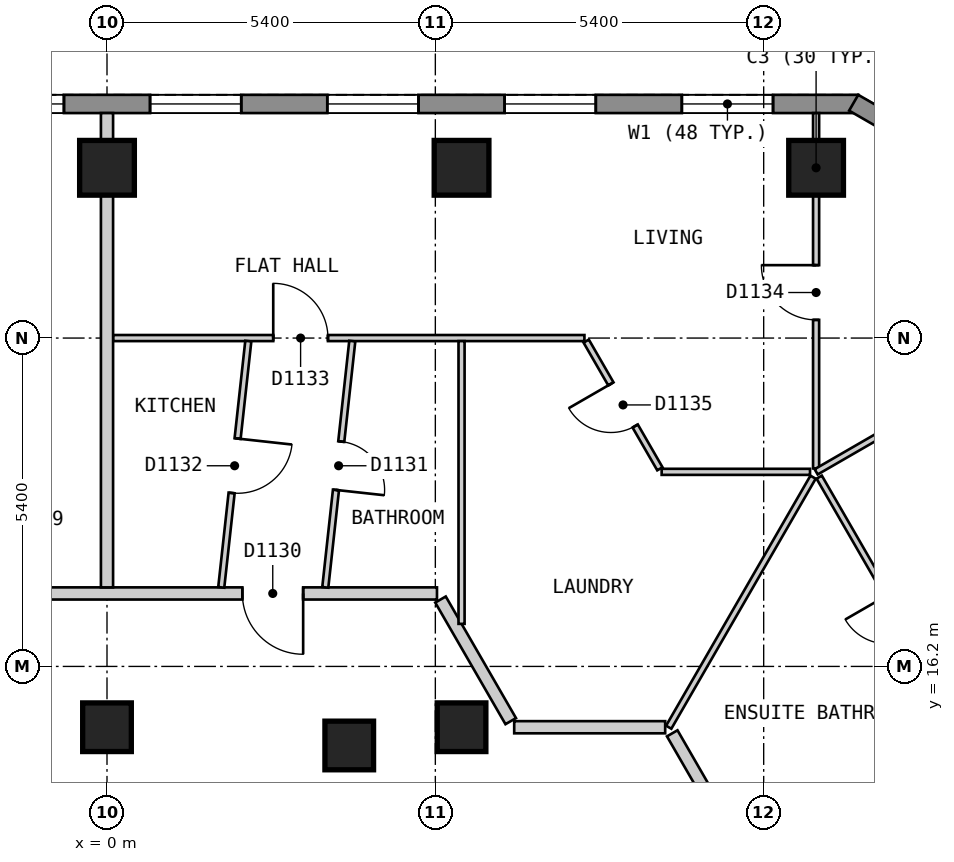
"""IFC4 building model, lengths in metres.
Left out: names, types, materials, properties, quantities, classifications, styles, units other than length and angle.
Written with IfcOpenShell. Run it as: python <this file> out.ifc"""

import sys

from ifc_helpers import new_model, si_unit, direction, frame, frame_2d, origin, origin_2d, place, context, subcontext, project, spatial, polyline, rectangle, outline, extrude, element, fill, save


model = new_model("IFC4")
c1 = context("Model", 3, precision=1e-05, world=origin(), true_north=direction((0.0, 1.0)))
c2 = subcontext(c1, "Body", "Model", "MODEL_VIEW")
j1 = project(units=[si_unit("LENGTHUNIT", "METRE"), si_unit("PLANEANGLEUNIT", "RADIAN")], contexts=[c1])
p1 = place(None, origin())
s1 = spatial("IfcSite", under=j1, at=p1, CompositionType="ELEMENT")
p2 = place(p1, origin())
s2 = spatial("IfcBuilding", under=s1, at=p2, CompositionType="ELEMENT")
p3 = place(p2, frame((0.0, 0.0, 144.6)))
s3 = spatial("IfcBuildingStorey", under=s2, at=p3, CompositionType="ELEMENT", Elevation=144.6)
for number, where, z_axis, x_axis in (
    (1, (11.662, 24.4, 0.0), (0.0, 0.0, 1.0), (-1.0, 0.0, 0.0)),
    (2, (5.831, 24.4, 0.0), (0.0, 0.0, 1.0), (-1.0, 0.0, 0.0)),
    (3, (0.0, 24.4, 0.0), (0.0, 0.0, 1.0), (-1.0, 0.0, 0.0)),
):
    element("IfcColumn", number, at=place(p3, frame(where, z_axis=z_axis, x_axis=x_axis)), inside=s3, PredefinedType="COLUMN", context=c2, shape_type="SweptSolid", body=[
        extrude(rectangle(XDim=0.9, YDim=0.9, at=origin_2d()), origin(), (0.0, 0.0, 1.0), 3.0),
    ])
for number, where, z_axis, x_axis in (
    (4, (5.831, 15.2, 0.0), (0.0, 0.0, 1.0), (-1.0, 0.0, 0.0)),
    (5, (3.984, 14.9, 0.0), (0.0, 0.0, 1.0), (1.0, 0.0, 0.0)),
    (6, (0.0, 15.2, 0.0), (0.0, 0.0, 1.0), (-1.0, 0.0, 0.0)),
):
    element("IfcColumn", number, at=place(p3, frame(where, z_axis=z_axis, x_axis=x_axis)), inside=s3, PredefinedType="COLUMN", context=c2, shape_type="SweptSolid", body=[
        extrude(rectangle(XDim=0.8, YDim=0.8, at=origin_2d()), origin(), (0.0, 0.0, 1.0), 3.0),
    ])
p4 = place(p3, frame((12.355, 25.45, 0.0), z_axis=(0.0, 0.0, 1.0), x_axis=(-1.0, 0.0, 0.0)))
e7 = element("IfcWall", 7, at=p4, inside=s3, PredefinedType="SOLIDWALL", context=c2, shape_type="SweptSolid", body=[
    extrude(outline(polyline([(0.0, -0.15), (24.71, -0.15), (24.63, 0.15), (0.08, 0.15), (0.0, -0.15)])), origin(), (0.0, 0.0, 1.0), 2.7),
])
p5 = place(p4, frame((1.401, 0.0, 0.15)))
e8 = element("IfcOpeningElement", 8, at=p5, cuts=e7, PredefinedType="OPENING", context=c2, shape_type="SweptSolid", body=[
    extrude(rectangle(XDim=1.5, YDim=2.1, at=frame_2d((0.75, 1.05))), frame((0.0, 0.16, 0.0), z_axis=(0.0, -1.0, 0.0), x_axis=(1.0, 0.0, 0.0)), (0.0, 0.0, 1.0), 0.32),
])
p6 = place(p4, frame((4.316, 0.0, 0.15)))
e9 = element("IfcOpeningElement", 9, at=p6, cuts=e7, PredefinedType="OPENING", context=c2, shape_type="SweptSolid", body=[
    extrude(rectangle(XDim=1.5, YDim=2.1, at=frame_2d((0.75, 1.05))), frame((0.0, 0.16, 0.0), z_axis=(0.0, -1.0, 0.0), x_axis=(1.0, 0.0, 0.0)), (0.0, 0.0, 1.0), 0.32),
])
p7 = place(p4, frame((7.232, 0.0, 0.15)))
e10 = element("IfcOpeningElement", 10, at=p7, cuts=e7, PredefinedType="OPENING", context=c2, shape_type="SweptSolid", body=[
    extrude(rectangle(XDim=1.5, YDim=2.1, at=frame_2d((0.75, 1.05))), frame((0.0, 0.16, 0.0), z_axis=(0.0, -1.0, 0.0), x_axis=(1.0, 0.0, 0.0)), (0.0, 0.0, 1.0), 0.32),
])
p8 = place(p4, frame((10.147, 0.0, 0.15)))
e11 = element("IfcOpeningElement", 11, at=p8, cuts=e7, PredefinedType="OPENING", context=c2, shape_type="SweptSolid", body=[
    extrude(rectangle(XDim=1.5, YDim=2.1, at=frame_2d((0.75, 1.05))), frame((0.0, 0.16, 0.0), z_axis=(0.0, -1.0, 0.0), x_axis=(1.0, 0.0, 0.0)), (0.0, 0.0, 1.0), 0.32),
])
p9 = place(p4, frame((13.063, 0.0, 0.15)))
e12 = element("IfcOpeningElement", 12, at=p9, cuts=e7, PredefinedType="OPENING", context=c2, shape_type="SweptSolid", body=[
    extrude(rectangle(XDim=1.5, YDim=2.1, at=frame_2d((0.75, 1.05))), frame((0.0, 0.16, 0.0), z_axis=(0.0, -1.0, 0.0), x_axis=(1.0, 0.0, 0.0)), (0.0, 0.0, 1.0), 0.32),
])
p10 = place(p4, frame((15.978, 0.0, 0.15)))
e13 = element("IfcOpeningElement", 13, at=p10, cuts=e7, PredefinedType="OPENING", context=c2, shape_type="SweptSolid", body=[
    extrude(rectangle(XDim=1.5, YDim=2.1, at=frame_2d((0.75, 1.05))), frame((0.0, 0.16, 0.0), z_axis=(0.0, -1.0, 0.0), x_axis=(1.0, 0.0, 0.0)), (0.0, 0.0, 1.0), 0.32),
])
p11 = place(p4, frame((18.894, 0.0, 0.15)))
e14 = element("IfcOpeningElement", 14, at=p11, cuts=e7, PredefinedType="OPENING", context=c2, shape_type="SweptSolid", body=[
    extrude(rectangle(XDim=1.5, YDim=2.1, at=frame_2d((0.75, 1.05))), frame((0.0, 0.16, 0.0), z_axis=(0.0, -1.0, 0.0), x_axis=(1.0, 0.0, 0.0)), (0.0, 0.0, 1.0), 0.32),
])
p12 = place(p4, frame((21.809, 0.0, 0.15)))
e15 = element("IfcOpeningElement", 15, at=p12, cuts=e7, PredefinedType="OPENING", context=c2, shape_type="SweptSolid", body=[
    extrude(rectangle(XDim=1.5, YDim=2.1, at=frame_2d((0.75, 1.05))), frame((0.0, 0.16, 0.0), z_axis=(0.0, -1.0, 0.0), x_axis=(1.0, 0.0, 0.0)), (0.0, 0.0, 1.0), 0.32),
])
p13 = place(p3, frame((16.61, 22.97, 0.0), z_axis=(0.0, 0.0, 1.0), x_axis=(-0.866022959057, 0.500004234368, 0.0)))
e16 = element("IfcWall", 16, at=p13, inside=s3, PredefinedType="SOLIDWALL", context=c2, shape_type="SweptSolid", body=[
    extrude(outline(polyline([(0.0, -0.15), (5.0, -0.15), (4.92, 0.15), (0.08, 0.15), (0.0, -0.15)])), origin(), (0.0, 0.0, 1.0), 2.7),
])
p14 = place(p13, frame((0.65, 0.0, 0.15)))
e17 = element("IfcOpeningElement", 17, at=p14, cuts=e16, PredefinedType="OPENING", context=c2, shape_type="SweptSolid", body=[
    extrude(rectangle(XDim=1.2, YDim=2.1, at=frame_2d((0.6, 1.05))), frame((0.0, 0.16, 0.0), z_axis=(0.0, -1.0, 0.0), x_axis=(1.0, 0.0, 0.0)), (0.0, 0.0, 1.0), 0.32),
])
p15 = place(p13, frame((3.15, 0.0, 0.15)))
e18 = element("IfcOpeningElement", 18, at=p15, cuts=e16, PredefinedType="OPENING", context=c2, shape_type="SweptSolid", body=[
    extrude(rectangle(XDim=1.2, YDim=2.1, at=frame_2d((0.6, 1.05))), frame((0.0, 0.16, 0.0), z_axis=(0.0, -1.0, 0.0), x_axis=(1.0, 0.0, 0.0)), (0.0, 0.0, 1.0), 0.32),
])
p16 = place(p3, frame((5.485, 17.3, 0.0), z_axis=(0.0, 0.0, 1.0), x_axis=(0.500027479704, -0.866009537788, 0.0)))
e19 = element("IfcWall", 19, at=p16, inside=s3, PredefinedType="PARTITIONING", context=c2, shape_type="SweptSolid", body=[
    extrude(rectangle(XDim=2.309, YDim=0.2, at=frame_2d((1.155, 0.0))), origin(), (0.0, 0.0, 1.0), 2.7),
])
p17 = place(p3, frame((9.296, 15.1, 0.0), z_axis=(0.0, 0.0, 1.0), x_axis=(0.499974024244, -0.866040400375, 0.0)))
e20 = element("IfcWall", 20, at=p17, inside=s3, PredefinedType="PARTITIONING", context=c2, shape_type="SweptSolid", body=[
    extrude(rectangle(XDim=16.857, YDim=0.2, at=frame_2d((8.429, 0.0))), origin(), (0.0, 0.0, 1.0), 2.7),
])
p18 = place(p17, frame((11.522, 0.0, 0.0)))
e21 = element("IfcOpeningElement", 21, at=p18, cuts=e20, PredefinedType="OPENING", context=c2, shape_type="SweptSolid", body=[
    extrude(rectangle(XDim=1.0, YDim=2.1, at=frame_2d((0.5, 1.05))), frame((0.0, 0.11, 0.0), z_axis=(0.0, -1.0, 0.0), x_axis=(1.0, 0.0, 0.0)), (0.0, 0.0, 1.0), 0.22),
])
p19 = place(p3, frame((6.697, 15.2, 0.0), z_axis=(0.0, 0.0, 1.0), x_axis=(1.0, 0.0, 0.0)))
e22 = element("IfcWall", 22, at=p19, inside=s3, PredefinedType="PARTITIONING", context=c2, shape_type="SweptSolid", body=[
    extrude(rectangle(XDim=2.483, YDim=0.2, at=frame_2d((1.241, 0.0))), origin(), (0.0, 0.0, 1.0), 2.7),
])
p20 = place(p3, frame((-5.312, 17.4, 0.0), z_axis=(0.0, 0.0, 1.0), x_axis=(1.0, 0.0, 0.0)))
e23 = element("IfcWall", 23, at=p20, inside=s3, PredefinedType="PARTITIONING", context=c2, shape_type="SweptSolid", body=[
    extrude(rectangle(XDim=10.739, YDim=0.2, at=frame_2d((5.37, 0.0))), origin(), (0.0, 0.0, 1.0), 2.7),
])
p21 = place(p20, frame((7.538, 0.0, 0.0)))
e24 = element("IfcOpeningElement", 24, at=p21, cuts=e23, PredefinedType="OPENING", context=c2, shape_type="SweptSolid", body=[
    extrude(rectangle(XDim=1.0, YDim=2.1, at=frame_2d((0.5, 1.05))), frame((0.0, 0.11, 0.0), z_axis=(0.0, -1.0, 0.0), x_axis=(1.0, 0.0, 0.0)), (0.0, 0.0, 1.0), 0.22),
])
p22 = place(p20, frame((1.864, 0.0, 0.0)))
e25 = element("IfcOpeningElement", 25, at=p22, cuts=e23, PredefinedType="OPENING", context=c2, shape_type="SweptSolid", body=[
    extrude(rectangle(XDim=1.0, YDim=2.1, at=frame_2d((0.5, 1.05))), frame((0.0, 0.11, 0.0), z_axis=(0.0, -1.0, 0.0), x_axis=(1.0, 0.0, 0.0)), (0.0, 0.0, 1.0), 0.22),
])
p23 = place(p3, frame((7.881, 21.55, 0.0), z_axis=(0.0, 0.0, 1.0), x_axis=(0.499821239653, -0.866128586522, 0.0)))
e26 = element("IfcWall", 26, at=p23, inside=s3, PredefinedType="PARTITIONING", context=c2, shape_type="SweptSolid", body=[
    extrude(rectangle(XDim=2.425, YDim=0.1, at=frame_2d((1.212, 0.0))), origin(), (0.0, 0.0, 1.0), 2.7),
])
p24 = place(p23, frame((0.812, 0.0, 0.0)))
e27 = element("IfcOpeningElement", 27, at=p24, cuts=e26, PredefinedType="OPENING", context=c2, shape_type="SweptSolid", body=[
    extrude(rectangle(XDim=0.8, YDim=2.1, at=frame_2d((0.4, 1.05))), frame((0.0, 0.06, 0.0), z_axis=(0.0, -1.0, 0.0), x_axis=(1.0, 0.0, 0.0)), (0.0, 0.0, 1.0), 0.12),
])
p25 = place(p3, frame((11.713, 19.313, 0.0), z_axis=(0.0, 0.0, 1.0), x_axis=(0.499945064984, -0.866057118208, 0.0)))
e28 = element("IfcWall", 28, at=p25, inside=s3, PredefinedType="PARTITIONING", context=c2, shape_type="SweptSolid", body=[
    extrude(rectangle(XDim=5.285, YDim=0.1, at=frame_2d((2.642, 0.0))), origin(), (0.0, 0.0, 1.0), 2.7),
])
p26 = place(p25, frame((2.242, 0.0, 0.0)))
e29 = element("IfcOpeningElement", 29, at=p26, cuts=e28, PredefinedType="OPENING", context=c2, shape_type="SweptSolid", body=[
    extrude(rectangle(XDim=0.8, YDim=2.1, at=frame_2d((0.4, 1.05))), frame((0.0, 0.06, 0.0), z_axis=(0.0, -1.0, 0.0), x_axis=(1.0, 0.0, 0.0)), (0.0, 0.0, 1.0), 0.12),
])
p27 = place(p3, frame((9.122, 19.4, 0.0), z_axis=(0.0, 0.0, 1.0), x_axis=(1.0, 0.0, 0.0)))
e30 = element("IfcWall", 30, at=p27, inside=s3, PredefinedType="PARTITIONING", context=c2, shape_type="SweptSolid", body=[
    extrude(rectangle(XDim=2.44, YDim=0.1, at=frame_2d((1.22, 0.0))), origin(), (0.0, 0.0, 1.0), 2.7),
])
p28 = place(p3, frame((0.1, 21.6, 0.0), z_axis=(0.0, 0.0, 1.0), x_axis=(1.0, 0.0, 0.0)))
e31 = element("IfcWall", 31, at=p28, inside=s3, PredefinedType="PARTITIONING", context=c2, shape_type="SweptSolid", body=[
    extrude(rectangle(XDim=7.752, YDim=0.1, at=frame_2d((3.876, 0.0))), origin(), (0.0, 0.0, 1.0), 2.7),
])
p29 = place(p28, frame((2.634, 0.0, 0.0)))
e32 = element("IfcOpeningElement", 32, at=p29, cuts=e31, PredefinedType="OPENING", context=c2, shape_type="SweptSolid", body=[
    extrude(rectangle(XDim=0.9, YDim=2.1, at=frame_2d((0.45, 1.05))), frame((0.0, 0.06, 0.0), z_axis=(0.0, -1.0, 0.0), x_axis=(1.0, 0.0, 0.0)), (0.0, 0.0, 1.0), 0.12),
])
p30 = place(p3, frame((9.238, 15.2, 0.0), z_axis=(0.0, 0.0, 1.0), x_axis=(0.499988022762, 0.866032318735, 0.0)))
e33 = element("IfcWall", 33, at=p30, inside=s3, PredefinedType="PARTITIONING", context=c2, shape_type="SweptSolid", body=[
    extrude(rectangle(XDim=4.748, YDim=0.1, at=frame_2d((2.374, 0.0))), origin(), (0.0, 0.0, 1.0), 2.7),
])
p31 = place(p3, frame((3.59, 17.5, 0.0), z_axis=(0.0, 0.0, 1.0), x_axis=(0.108938463119, 0.994048495423, 0.0)))
e34 = element("IfcWall", 34, at=p31, inside=s3, PredefinedType="PARTITIONING", context=c2, shape_type="SweptSolid", body=[
    extrude(rectangle(XDim=4.074, YDim=0.1, at=frame_2d((2.037, 0.0))), origin(), (0.0, 0.0, 1.0), 2.7),
])
p32 = place(p31, frame((1.612, 0.0, 0.0)))
e35 = element("IfcOpeningElement", 35, at=p32, cuts=e34, PredefinedType="OPENING", context=c2, shape_type="SweptSolid", body=[
    extrude(rectangle(XDim=0.8, YDim=2.1, at=frame_2d((0.4, 1.05))), frame((0.0, 0.06, 0.0), z_axis=(0.0, -1.0, 0.0), x_axis=(1.0, 0.0, 0.0)), (0.0, 0.0, 1.0), 0.12),
])
p33 = place(p3, frame((1.879, 17.5, 0.0), z_axis=(0.0, 0.0, 1.0), x_axis=(0.10923450369, 0.994016007519, 0.0)))
e36 = element("IfcWall", 36, at=p33, inside=s3, PredefinedType="PARTITIONING", context=c2, shape_type="SweptSolid", body=[
    extrude(rectangle(XDim=4.074, YDim=0.1, at=frame_2d((2.037, 0.0))), origin(), (0.0, 0.0, 1.0), 2.7),
])
p34 = place(p33, frame((1.562, 0.0, 0.0)))
e37 = element("IfcOpeningElement", 37, at=p34, cuts=e36, PredefinedType="OPENING", context=c2, shape_type="SweptSolid", body=[
    extrude(rectangle(XDim=0.9, YDim=2.1, at=frame_2d((0.45, 1.05))), frame((0.0, 0.06, 0.0), z_axis=(0.0, -1.0, 0.0), x_axis=(1.0, 0.0, 0.0)), (0.0, 0.0, 1.0), 0.12),
])
p35 = place(p3, frame((5.831, 16.9, 0.0), z_axis=(0.0, 0.0, 1.0), x_axis=(0.0, 1.0, 0.0)))
e38 = element("IfcWall", 38, at=p35, inside=s3, PredefinedType="PARTITIONING", context=c2, shape_type="SweptSolid", body=[
    extrude(rectangle(XDim=4.65, YDim=0.1, at=frame_2d((2.325, 0.0))), origin(), (0.0, 0.0, 1.0), 2.7),
])
p36 = place(p3, frame((11.662, 19.456, 0.0), z_axis=(0.0, 0.0, 1.0), x_axis=(0.0, 1.0, 0.0)))
e39 = element("IfcWall", 39, at=p36, inside=s3, PredefinedType="PARTITIONING", context=c2, shape_type="SweptSolid", body=[
    extrude(rectangle(XDim=5.844, YDim=0.1, at=frame_2d((2.922, 0.0))), origin(), (0.0, 0.0, 1.0), 2.7),
])
p37 = place(p36, frame((2.443, 0.0, 0.0)))
e40 = element("IfcOpeningElement", 40, at=p37, cuts=e39, PredefinedType="OPENING", context=c2, shape_type="SweptSolid", body=[
    extrude(rectangle(XDim=0.9, YDim=2.1, at=frame_2d((0.45, 1.05))), frame((0.0, 0.06, 0.0), z_axis=(0.0, -1.0, 0.0), x_axis=(1.0, 0.0, 0.0)), (0.0, 0.0, 1.0), 0.12),
])
p38 = place(p3, frame((11.663, 19.4, 0.0), z_axis=(0.0, 0.0, 1.0), x_axis=(0.865941558533, 0.500145196124, 0.0)))
e41 = element("IfcWall", 41, at=p38, inside=s3, PredefinedType="PARTITIONING", context=c2, shape_type="SweptSolid", body=[
    extrude(rectangle(XDim=5.899, YDim=0.1, at=frame_2d((2.949, 0.0))), origin(), (0.0, 0.0, 1.0), 2.7),
])
p39 = place(p38, frame((2.499, 0.0, 0.0)))
e42 = element("IfcOpeningElement", 42, at=p39, cuts=e41, PredefinedType="OPENING", context=c2, shape_type="SweptSolid", body=[
    extrude(rectangle(XDim=0.9, YDim=2.1, at=frame_2d((0.45, 1.05))), frame((0.0, 0.06, 0.0), z_axis=(0.0, -1.0, 0.0), x_axis=(1.0, 0.0, 0.0)), (0.0, 0.0, 1.0), 0.12),
])
p40 = place(p3, frame((0.0, 17.5, 0.0), z_axis=(0.0, 0.0, 1.0), x_axis=(0.0, 1.0, 0.0)))
e43 = element("IfcWall", 43, at=p40, inside=s3, PredefinedType="PARTITIONING", context=c2, shape_type="SweptSolid", body=[
    extrude(rectangle(XDim=7.8, YDim=0.2, at=frame_2d((3.9, 0.0))), origin(), (0.0, 0.0, 1.0), 2.7),
])
p41 = place(p3, frame((10.854, 12.6, 0.0), z_axis=(0.0, 0.0, 1.0), x_axis=(0.866031112038, 0.499990112884, 0.0)))
e44 = element("IfcWall", 44, at=p41, inside=s3, PredefinedType="PARTITIONING", context=c2, shape_type="SweptSolid", body=[
    extrude(rectangle(XDim=3.948, YDim=0.2, at=frame_2d((1.974, 0.0))), origin(), (0.0, 0.0, 1.0), 2.7),
])
p42 = place(p5, origin())
e45 = element("IfcWindow", 45, at=p42, inside=s3, PartitioningType="SINGLE_PANEL", PredefinedType="WINDOW", context=c2, shape_type="SweptSolid", body=[
    extrude(rectangle(XDim=1.5, YDim=2.1, at=frame_2d((0.75, 1.05))), frame((0.0, 0.03, 0.0), z_axis=(0.0, -1.0, 0.0), x_axis=(1.0, 0.0, 0.0)), (0.0, 0.0, 1.0), 0.06),
])
fill(e8, e45)
p43 = place(p6, origin())
e46 = element("IfcWindow", 46, at=p43, inside=s3, PartitioningType="SINGLE_PANEL", PredefinedType="WINDOW", context=c2, shape_type="SweptSolid", body=[
    extrude(rectangle(XDim=1.5, YDim=2.1, at=frame_2d((0.75, 1.05))), frame((0.0, 0.03, 0.0), z_axis=(0.0, -1.0, 0.0), x_axis=(1.0, 0.0, 0.0)), (0.0, 0.0, 1.0), 0.06),
])
fill(e9, e46)
p44 = place(p7, origin())
e47 = element("IfcWindow", 47, at=p44, inside=s3, PartitioningType="SINGLE_PANEL", PredefinedType="WINDOW", context=c2, shape_type="SweptSolid", body=[
    extrude(rectangle(XDim=1.5, YDim=2.1, at=frame_2d((0.75, 1.05))), frame((0.0, 0.03, 0.0), z_axis=(0.0, -1.0, 0.0), x_axis=(1.0, 0.0, 0.0)), (0.0, 0.0, 1.0), 0.06),
])
fill(e10, e47)
p45 = place(p8, origin())
e48 = element("IfcWindow", 48, at=p45, inside=s3, PartitioningType="SINGLE_PANEL", PredefinedType="WINDOW", context=c2, shape_type="SweptSolid", body=[
    extrude(rectangle(XDim=1.5, YDim=2.1, at=frame_2d((0.75, 1.05))), frame((0.0, 0.03, 0.0), z_axis=(0.0, -1.0, 0.0), x_axis=(1.0, 0.0, 0.0)), (0.0, 0.0, 1.0), 0.06),
])
fill(e11, e48)
p46 = place(p9, origin())
e49 = element("IfcWindow", 49, at=p46, inside=s3, PartitioningType="SINGLE_PANEL", PredefinedType="WINDOW", context=c2, shape_type="SweptSolid", body=[
    extrude(rectangle(XDim=1.5, YDim=2.1, at=frame_2d((0.75, 1.05))), frame((0.0, 0.03, 0.0), z_axis=(0.0, -1.0, 0.0), x_axis=(1.0, 0.0, 0.0)), (0.0, 0.0, 1.0), 0.06),
])
fill(e12, e49)
p47 = place(p21, origin())
e50 = element("IfcDoor", 50, at=p47, inside=s3, OperationType="SINGLE_SWING_RIGHT", PredefinedType="DOOR", context=c2, shape_type="SweptSolid", body=[
    extrude(rectangle(XDim=1.0, YDim=2.1, at=frame_2d((0.5, 1.05))), frame((0.0, 0.025, 0.0), z_axis=(0.0, -1.0, 0.0), x_axis=(1.0, 0.0, 0.0)), (0.0, 0.0, 1.0), 0.05),
])
fill(e24, e50)
p48 = place(p32, origin())
e51 = element("IfcDoor", 51, at=p48, inside=s3, OperationType="SINGLE_SWING_LEFT", PredefinedType="DOOR", context=c2, shape_type="SweptSolid", body=[
    extrude(rectangle(XDim=0.8, YDim=2.1, at=frame_2d((0.4, 1.05))), frame((0.0, 0.025, 0.0), z_axis=(0.0, -1.0, 0.0), x_axis=(1.0, 0.0, 0.0)), (0.0, 0.0, 1.0), 0.05),
])
fill(e35, e51)
p49 = place(p34, origin())
e52 = element("IfcDoor", 52, at=p49, inside=s3, OperationType="SINGLE_SWING_RIGHT", PredefinedType="DOOR", context=c2, shape_type="SweptSolid", body=[
    extrude(rectangle(XDim=0.9, YDim=2.1, at=frame_2d((0.45, 1.05))), frame((0.0, 0.025, 0.0), z_axis=(0.0, -1.0, 0.0), x_axis=(1.0, 0.0, 0.0)), (0.0, 0.0, 1.0), 0.05),
])
fill(e37, e52)
p50 = place(p29, origin())
e53 = element("IfcDoor", 53, at=p50, inside=s3, OperationType="SINGLE_SWING_LEFT", PredefinedType="DOOR", context=c2, shape_type="SweptSolid", body=[
    extrude(rectangle(XDim=0.9, YDim=2.1, at=frame_2d((0.45, 1.05))), frame((0.0, 0.025, 0.0), z_axis=(0.0, -1.0, 0.0), x_axis=(1.0, 0.0, 0.0)), (0.0, 0.0, 1.0), 0.05),
])
fill(e32, e53)
p51 = place(p37, origin())
e54 = element("IfcDoor", 54, at=p51, inside=s3, OperationType="SINGLE_SWING_RIGHT", PredefinedType="DOOR", context=c2, shape_type="SweptSolid", body=[
    extrude(rectangle(XDim=0.9, YDim=2.1, at=frame_2d((0.45, 1.05))), frame((0.0, 0.025, 0.0), z_axis=(0.0, -1.0, 0.0), x_axis=(1.0, 0.0, 0.0)), (0.0, 0.0, 1.0), 0.05),
])
fill(e40, e54)
p52 = place(p24, origin())
e55 = element("IfcDoor", 55, at=p52, inside=s3, OperationType="SINGLE_SWING_LEFT", PredefinedType="DOOR", context=c2, shape_type="SweptSolid", body=[
    extrude(rectangle(XDim=0.8, YDim=2.1, at=frame_2d((0.4, 1.05))), frame((0.0, 0.025, 0.0), z_axis=(0.0, -1.0, 0.0), x_axis=(1.0, 0.0, 0.0)), (0.0, 0.0, 1.0), 0.05),
])
fill(e27, e55)
save(model, sys.argv[1])
